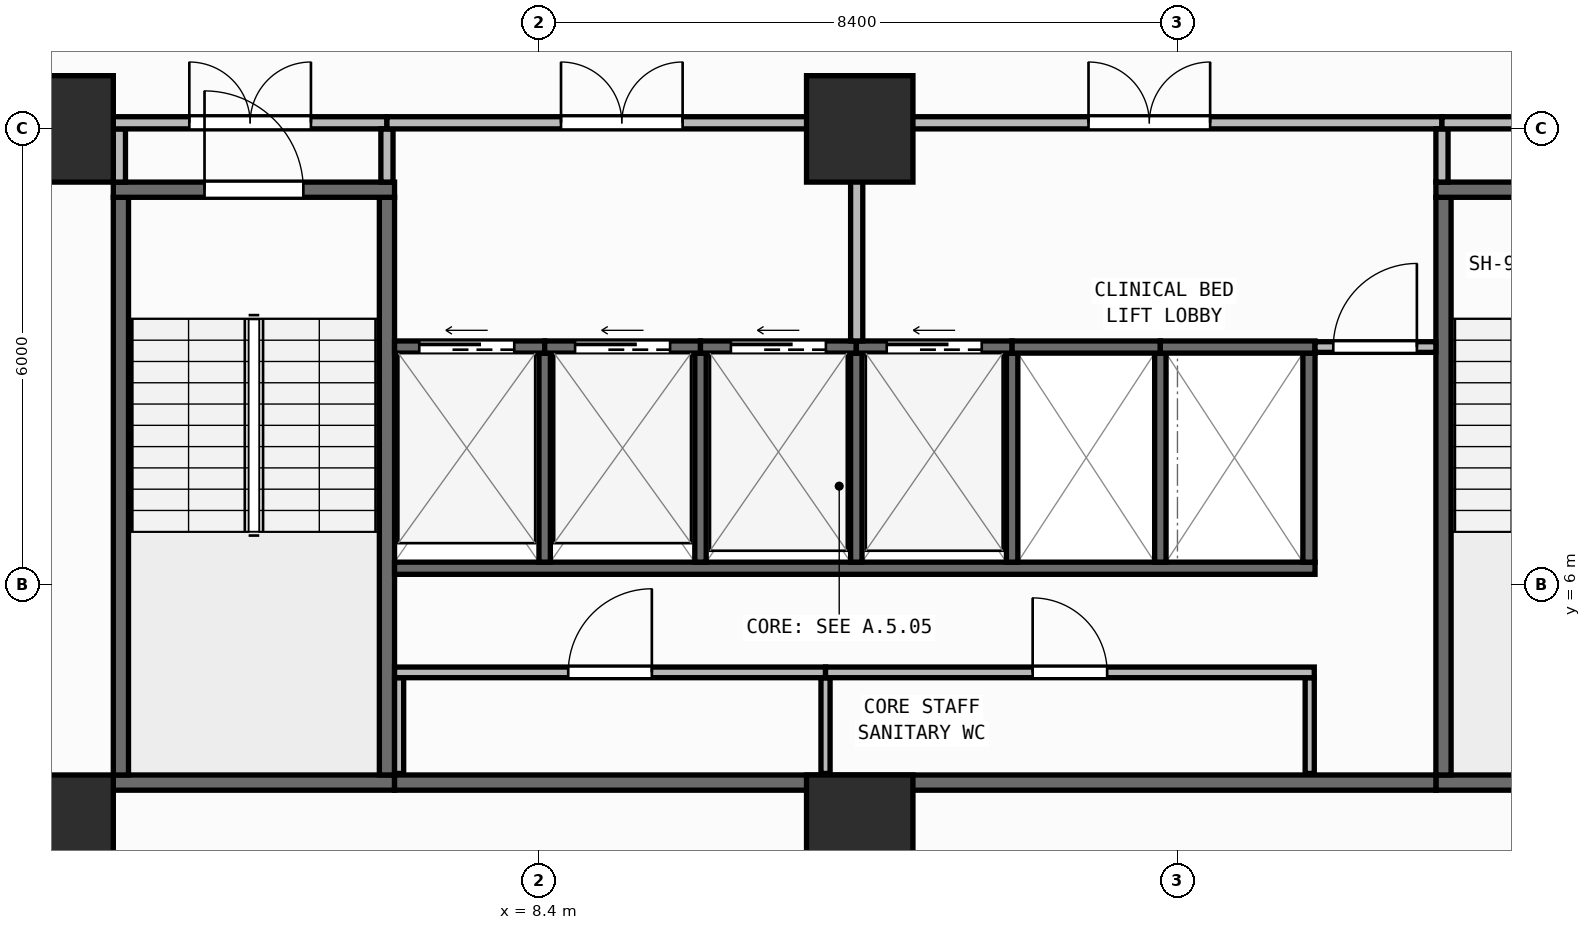
"""IFC4 building model, lengths in metres.
Left out: names, types, materials, properties, quantities, classifications, styles, units other than length and angle.
Written with IfcOpenShell. Run it as: python <this file> out.ifc"""

import sys

from ifc_helpers import new_model, si_unit, direction, frame, frame_2d, origin, origin_2d, place, context, subcontext, project, spatial, rectangle, extrude, element, fill, save


model = new_model("IFC4")
c1 = context("Model", 3, precision=1e-05, world=origin(), true_north=direction((0.0, 1.0)))
c2 = subcontext(c1, "Body", "Model", "MODEL_VIEW")
j1 = project(units=[si_unit("LENGTHUNIT", "METRE"), si_unit("PLANEANGLEUNIT", "RADIAN")], contexts=[c1])
p1 = place(None, origin())
s1 = spatial("IfcSite", under=j1, at=p1, CompositionType="ELEMENT")
p2 = place(p1, origin())
s2 = spatial("IfcBuilding", under=s1, at=p2, CompositionType="ELEMENT")
p3 = place(p2, frame((0.0, 0.0, 30.4)))
s3 = spatial("IfcBuildingStorey", under=s2, at=p3, CompositionType="ELEMENT", Elevation=30.4)
for number, where, z_axis, x_axis in (
    (1, (2.1, 2.8, 0.0), (0.0, 0.0, 1.0), (1.0, 0.0, 0.0)),
    (2, (12.62, 2.8, 0.0), (0.0, 0.0, 1.0), (1.0, 0.0, 0.0)),
    (3, (2.1, 12.0, 0.0), (0.0, 0.0, 1.0), (1.0, 0.0, 0.0)),
    (4, (12.62, 12.0, 0.0), (0.0, 0.0, 1.0), (1.0, 0.0, 0.0)),
):
    element("IfcColumn", number, at=place(p3, frame(where, z_axis=z_axis, x_axis=x_axis)), inside=s3, PredefinedType="COLUMN", context=c2, shape_type="SweptSolid", body=[
        extrude(rectangle(XDim=1.4, YDim=1.4, at=origin_2d()), origin(), (0.0, 0.0, 1.0), 3.95),
    ])
p4 = place(p3, frame((2.76, 0.174, 0.0), z_axis=(0.0, 0.0, 1.0), x_axis=(0.996571478456, 0.082736257641, 0.0)))
e5 = element("IfcWall", 5, at=p4, inside=s3, PredefinedType="STANDARD", context=c2, shape_type="SweptSolid", body=[
    extrude(rectangle(XDim=52.861, YDim=0.26, at=frame_2d((26.431, 0.0))), origin(), (0.0, 0.0, 1.0), 3.71),
])
p5 = place(p4, frame((25.231, 0.0, 0.9)))
e6 = element("IfcOpeningElement", 6, at=p5, cuts=e5, PredefinedType="OPENING", context=c2, shape_type="SweptSolid", body=[
    extrude(rectangle(XDim=2.4, YDim=1.65, at=frame_2d((1.2, 0.825))), frame((0.0, 0.14, 0.0), z_axis=(0.0, -1.0, 0.0), x_axis=(1.0, 0.0, 0.0)), (0.0, 0.0, 1.0), 0.28),
])
p6 = place(p3, frame((2.8, 3.4, 0.0), z_axis=(0.0, 0.0, 1.0), x_axis=(1.0, 0.0, 0.0)))
e7 = element("IfcWall", 7, at=p6, inside=s3, PredefinedType="SHEAR", context=c2, shape_type="SweptSolid", body=[
    extrude(rectangle(XDim=3.7, YDim=0.2, at=frame_2d((1.85, 0.0))), origin(), (0.0, 0.0, 1.0), 3.71),
])
for number, where, z_axis, x_axis in (
    (8, (2.9, 3.5, 0.0), (0.0, 0.0, 1.0), (0.0, 1.0, 0.0)),
    (9, (6.4, 3.5, 0.0), (0.0, 0.0, 1.0), (0.0, 1.0, 0.0)),
):
    element("IfcWall", number, at=place(p3, frame(where, z_axis=z_axis, x_axis=x_axis)), inside=s3, PredefinedType="SHEAR", context=c2, shape_type="SweptSolid", body=[
        extrude(rectangle(XDim=7.6, YDim=0.2, at=frame_2d((3.8, 0.0))), origin(), (0.0, 0.0, 1.0), 3.71),
    ])
p7 = place(p3, frame((2.8, 11.2, 0.0), z_axis=(0.0, 0.0, 1.0), x_axis=(1.0, 0.0, 0.0)))
e10 = element("IfcWall", 10, at=p7, inside=s3, PredefinedType="SHEAR", context=c2, shape_type="SweptSolid", body=[
    extrude(rectangle(XDim=3.7, YDim=0.2, at=frame_2d((1.85, 0.0))), origin(), (0.0, 0.0, 1.0), 3.71),
])
p8 = place(p7, frame((1.2, 0.0, 0.0)))
e11 = element("IfcOpeningElement", 11, at=p8, cuts=e10, PredefinedType="OPENING", context=c2, shape_type="SweptSolid", body=[
    extrude(rectangle(XDim=1.3, YDim=2.15, at=frame_2d((0.65, 1.075))), frame((0.0, 0.11, 0.0), z_axis=(0.0, -1.0, 0.0), x_axis=(1.0, 0.0, 0.0)), (0.0, 0.0, 1.0), 0.22),
])
p9 = place(p3, frame((20.2, 3.4, 0.0), z_axis=(0.0, 0.0, 1.0), x_axis=(1.0, 0.0, 0.0)))
e12 = element("IfcWall", 12, at=p9, inside=s3, PredefinedType="SHEAR", context=c2, shape_type="SweptSolid", body=[
    extrude(rectangle(XDim=3.7, YDim=0.2, at=frame_2d((1.85, 0.0))), origin(), (0.0, 0.0, 1.0), 3.71),
])
p10 = place(p3, frame((20.3, 3.5, 0.0), z_axis=(0.0, 0.0, 1.0), x_axis=(0.0, 1.0, 0.0)))
e13 = element("IfcWall", 13, at=p10, inside=s3, PredefinedType="SHEAR", context=c2, shape_type="SweptSolid", body=[
    extrude(rectangle(XDim=7.6, YDim=0.2, at=frame_2d((3.8, 0.0))), origin(), (0.0, 0.0, 1.0), 3.71),
])
p11 = place(p3, frame((20.2, 11.2, 0.0), z_axis=(0.0, 0.0, 1.0), x_axis=(1.0, 0.0, 0.0)))
e14 = element("IfcWall", 14, at=p11, inside=s3, PredefinedType="SHEAR", context=c2, shape_type="SweptSolid", body=[
    extrude(rectangle(XDim=3.7, YDim=0.2, at=frame_2d((1.85, 0.0))), origin(), (0.0, 0.0, 1.0), 3.71),
])
p12 = place(p11, frame((1.2, 0.0, 0.0)))
e15 = element("IfcOpeningElement", 15, at=p12, cuts=e14, PredefinedType="OPENING", context=c2, shape_type="SweptSolid", body=[
    extrude(rectangle(XDim=1.3, YDim=2.15, at=frame_2d((0.65, 1.075))), frame((0.0, 0.11, 0.0), z_axis=(0.0, -1.0, 0.0), x_axis=(1.0, 0.0, 0.0)), (0.0, 0.0, 1.0), 0.22),
])
p13 = place(p3, frame((6.5, 3.4, 0.0), z_axis=(0.0, 0.0, 1.0), x_axis=(1.0, 0.0, 0.0)))
e16 = element("IfcWall", 16, at=p13, inside=s3, PredefinedType="SHEAR", context=c2, shape_type="SweptSolid", body=[
    extrude(rectangle(XDim=13.7, YDim=0.2, at=frame_2d((6.85, 0.0))), origin(), (0.0, 0.0, 1.0), 3.71),
])
p14 = place(p3, frame((6.5, 6.22, 0.0), z_axis=(0.0, 0.0, 1.0), x_axis=(1.0, 0.0, 0.0)))
e17 = element("IfcWall", 17, at=p14, inside=s3, PredefinedType="SHEAR", context=c2, shape_type="SweptSolid", body=[
    extrude(rectangle(XDim=12.11, YDim=0.16, at=frame_2d((6.055, 0.0))), origin(), (0.0, 0.0, 1.0), 3.71),
])
p15 = place(p3, frame((18.53, 6.3, 0.0), z_axis=(0.0, 0.0, 1.0), x_axis=(0.0, 1.0, 0.0)))
e18 = element("IfcWall", 18, at=p15, inside=s3, PredefinedType="SHEAR", context=c2, shape_type="SweptSolid", body=[
    extrude(rectangle(XDim=2.75, YDim=0.16, at=frame_2d((1.375, 0.0))), origin(), (0.0, 0.0, 1.0), 3.71),
])
for number, where, z_axis, x_axis in (
    (19, (8.475, 6.3, 0.0), (0.0, 0.0, 1.0), (0.0, 1.0, 0.0)),
    (20, (10.525, 6.3, 0.0), (0.0, 0.0, 1.0), (0.0, 1.0, 0.0)),
    (21, (12.575, 6.3, 0.0), (0.0, 0.0, 1.0), (0.0, 1.0, 0.0)),
    (22, (14.625, 6.3, 0.0), (0.0, 0.0, 1.0), (0.0, 1.0, 0.0)),
    (23, (16.575, 6.3, 0.0), (0.0, 0.0, 1.0), (0.0, 1.0, 0.0)),
):
    element("IfcWall", number, at=place(p3, frame(where, z_axis=z_axis, x_axis=x_axis)), inside=s3, PredefinedType="SHEAR", context=c2, shape_type="SweptSolid", body=[
        extrude(rectangle(XDim=2.75, YDim=0.15, at=frame_2d((1.375, 0.0))), origin(), (0.0, 0.0, 1.0), 3.71),
    ])
p16 = place(p3, frame((6.5, 9.13, 0.0), z_axis=(0.0, 0.0, 1.0), x_axis=(1.0, 0.0, 0.0)))
e24 = element("IfcWall", 24, at=p16, inside=s3, PredefinedType="SHEAR", context=c2, shape_type="SweptSolid", body=[
    extrude(rectangle(XDim=1.975, YDim=0.16, at=frame_2d((0.988, 0.0))), origin(), (0.0, 0.0, 1.0), 3.71),
])
p17 = place(p16, frame((0.325, 0.0, 0.0)))
e25 = element("IfcOpeningElement", 25, at=p17, cuts=e24, PredefinedType="OPENING", context=c2, shape_type="SweptSolid", body=[
    extrude(rectangle(XDim=1.25, YDim=2.15, at=frame_2d((0.625, 1.075))), frame((0.0, 0.09, 0.0), z_axis=(0.0, -1.0, 0.0), x_axis=(1.0, 0.0, 0.0)), (0.0, 0.0, 1.0), 0.18),
])
p18 = place(p3, frame((8.475, 9.13, 0.0), z_axis=(0.0, 0.0, 1.0), x_axis=(1.0, 0.0, 0.0)))
e26 = element("IfcWall", 26, at=p18, inside=s3, PredefinedType="SHEAR", context=c2, shape_type="SweptSolid", body=[
    extrude(rectangle(XDim=2.05, YDim=0.16, at=frame_2d((1.025, 0.0))), origin(), (0.0, 0.0, 1.0), 3.71),
])
p19 = place(p18, frame((0.4, 0.0, 0.0)))
e27 = element("IfcOpeningElement", 27, at=p19, cuts=e26, PredefinedType="OPENING", context=c2, shape_type="SweptSolid", body=[
    extrude(rectangle(XDim=1.25, YDim=2.15, at=frame_2d((0.625, 1.075))), frame((0.0, 0.09, 0.0), z_axis=(0.0, -1.0, 0.0), x_axis=(1.0, 0.0, 0.0)), (0.0, 0.0, 1.0), 0.18),
])
p20 = place(p3, frame((10.525, 9.13, 0.0), z_axis=(0.0, 0.0, 1.0), x_axis=(1.0, 0.0, 0.0)))
e28 = element("IfcWall", 28, at=p20, inside=s3, PredefinedType="SHEAR", context=c2, shape_type="SweptSolid", body=[
    extrude(rectangle(XDim=2.05, YDim=0.16, at=frame_2d((1.025, 0.0))), origin(), (0.0, 0.0, 1.0), 3.71),
])
p21 = place(p20, frame((0.4, 0.0, 0.0)))
e29 = element("IfcOpeningElement", 29, at=p21, cuts=e28, PredefinedType="OPENING", context=c2, shape_type="SweptSolid", body=[
    extrude(rectangle(XDim=1.25, YDim=2.15, at=frame_2d((0.625, 1.075))), frame((0.0, 0.09, 0.0), z_axis=(0.0, -1.0, 0.0), x_axis=(1.0, 0.0, 0.0)), (0.0, 0.0, 1.0), 0.18),
])
p22 = place(p3, frame((12.575, 9.13, 0.0), z_axis=(0.0, 0.0, 1.0), x_axis=(1.0, 0.0, 0.0)))
e30 = element("IfcWall", 30, at=p22, inside=s3, PredefinedType="SHEAR", context=c2, shape_type="SweptSolid", body=[
    extrude(rectangle(XDim=2.05, YDim=0.16, at=frame_2d((1.025, 0.0))), origin(), (0.0, 0.0, 1.0), 3.71),
])
p23 = place(p22, frame((0.4, 0.0, 0.0)))
e31 = element("IfcOpeningElement", 31, at=p23, cuts=e30, PredefinedType="OPENING", context=c2, shape_type="SweptSolid", body=[
    extrude(rectangle(XDim=1.25, YDim=2.15, at=frame_2d((0.625, 1.075))), frame((0.0, 0.09, 0.0), z_axis=(0.0, -1.0, 0.0), x_axis=(1.0, 0.0, 0.0)), (0.0, 0.0, 1.0), 0.18),
])
p24 = place(p3, frame((14.625, 9.13, 0.0), z_axis=(0.0, 0.0, 1.0), x_axis=(1.0, 0.0, 0.0)))
e32 = element("IfcWall", 32, at=p24, inside=s3, PredefinedType="SHEAR", context=c2, shape_type="SweptSolid", body=[
    extrude(rectangle(XDim=1.95, YDim=0.16, at=frame_2d((0.975, 0.0))), origin(), (0.0, 0.0, 1.0), 3.71),
])
p25 = place(p3, frame((16.575, 9.13, 0.0), z_axis=(0.0, 0.0, 1.0), x_axis=(1.0, 0.0, 0.0)))
e33 = element("IfcWall", 33, at=p25, inside=s3, PredefinedType="SHEAR", context=c2, shape_type="SweptSolid", body=[
    extrude(rectangle(XDim=2.035, YDim=0.16, at=frame_2d((1.018, 0.0))), origin(), (0.0, 0.0, 1.0), 3.71),
])
for number, where, z_axis, x_axis in (
    (34, (6.56, 3.52, 0.0), (0.0, 0.0, 1.0), (0.0, 1.0, 0.0)),
    (35, (12.17, 3.52, 0.0), (0.0, 0.0, 1.0), (0.0, 1.0, 0.0)),
    (36, (18.54, 3.52, 0.0), (0.0, 0.0, 1.0), (0.0, 1.0, 0.0)),
):
    element("IfcWall", number, at=place(p3, frame(where, z_axis=z_axis, x_axis=x_axis)), inside=s3, PredefinedType="PARTITIONING", context=c2, shape_type="SweptSolid", body=[
        extrude(rectangle(XDim=1.26, YDim=0.12, at=frame_2d((0.63, 0.0))), origin(), (0.0, 0.0, 1.0), 3.71),
    ])
p26 = place(p3, frame((6.5, 4.85, 0.0), z_axis=(0.0, 0.0, 1.0), x_axis=(1.0, 0.0, 0.0)))
e37 = element("IfcWall", 37, at=p26, inside=s3, PredefinedType="PARTITIONING", context=c2, shape_type="SweptSolid", body=[
    extrude(rectangle(XDim=5.67, YDim=0.14, at=frame_2d((2.835, 0.0))), origin(), (0.0, 0.0, 1.0), 3.71),
])
p27 = place(p26, frame((2.285, 0.0, 0.0)))
e38 = element("IfcOpeningElement", 38, at=p27, cuts=e37, PredefinedType="OPENING", context=c2, shape_type="SweptSolid", body=[
    extrude(rectangle(XDim=1.1, YDim=2.1, at=frame_2d((0.55, 1.05))), frame((0.0, 0.08, 0.0), z_axis=(0.0, -1.0, 0.0), x_axis=(1.0, 0.0, 0.0)), (0.0, 0.0, 1.0), 0.16),
])
p28 = place(p3, frame((12.17, 4.85, 0.0), z_axis=(0.0, 0.0, 1.0), x_axis=(1.0, 0.0, 0.0)))
e39 = element("IfcWall", 39, at=p28, inside=s3, PredefinedType="PARTITIONING", context=c2, shape_type="SweptSolid", body=[
    extrude(rectangle(XDim=6.43, YDim=0.14, at=frame_2d((3.215, 0.0))), origin(), (0.0, 0.0, 1.0), 3.71),
])
p29 = place(p28, frame((2.725, 0.0, 0.0)))
e40 = element("IfcOpeningElement", 40, at=p29, cuts=e39, PredefinedType="OPENING", context=c2, shape_type="SweptSolid", body=[
    extrude(rectangle(XDim=0.98, YDim=2.1, at=frame_2d((0.49, 1.05))), frame((0.0, 0.08, 0.0), z_axis=(0.0, -1.0, 0.0), x_axis=(1.0, 0.0, 0.0)), (0.0, 0.0, 1.0), 0.16),
])
p30 = place(p3, frame((18.61, 9.13, 0.0), z_axis=(0.0, 0.0, 1.0), x_axis=(1.0, 0.0, 0.0)))
e41 = element("IfcWall", 41, at=p30, inside=s3, PredefinedType="PARTITIONING", context=c2, shape_type="SweptSolid", body=[
    extrude(rectangle(XDim=1.59, YDim=0.14, at=frame_2d((0.795, 0.0))), origin(), (0.0, 0.0, 1.0), 3.71),
])
p31 = place(p30, frame((0.24, 0.0, 0.0)))
e42 = element("IfcOpeningElement", 42, at=p31, cuts=e41, PredefinedType="OPENING", context=c2, shape_type="SweptSolid", body=[
    extrude(rectangle(XDim=1.1, YDim=2.1, at=frame_2d((0.55, 1.05))), frame((0.0, 0.08, 0.0), z_axis=(0.0, -1.0, 0.0), x_axis=(1.0, 0.0, 0.0)), (0.0, 0.0, 1.0), 0.16),
])
p32 = place(p3, frame((2.88, 11.3, 0.0), z_axis=(0.0, 0.0, 1.0), x_axis=(0.0, 1.0, 0.0)))
e43 = element("IfcWall", 43, at=p32, inside=s3, PredefinedType="PARTITIONING", context=c2, shape_type="SweptSolid", body=[
    extrude(rectangle(XDim=0.7, YDim=0.16, at=frame_2d((0.35, 0.0))), origin(), (0.0, 0.0, 1.0), 3.71),
])
p33 = place(p3, frame((2.8, 12.08, 0.0), z_axis=(0.0, 0.0, 1.0), x_axis=(1.0, 0.0, 0.0)))
e44 = element("IfcWall", 44, at=p33, inside=s3, PredefinedType="PARTITIONING", context=c2, shape_type="SweptSolid", body=[
    extrude(rectangle(XDim=3.6, YDim=0.16, at=frame_2d((1.8, 0.0))), origin(), (0.0, 0.0, 1.0), 3.073),
])
p34 = place(p33, frame((1.0, 0.0, 0.0)))
e45 = element("IfcOpeningElement", 45, at=p34, cuts=e44, PredefinedType="OPENING", context=c2, shape_type="SweptSolid", body=[
    extrude(rectangle(XDim=1.6, YDim=2.05, at=frame_2d((0.8, 1.025))), frame((0.0, 0.09, 0.0), z_axis=(0.0, -1.0, 0.0), x_axis=(1.0, 0.0, 0.0)), (0.0, 0.0, 1.0), 0.18),
])
p35 = place(p3, frame((6.4, 11.3, 0.0), z_axis=(0.0, 0.0, 1.0), x_axis=(0.0, 1.0, 0.0)))
e46 = element("IfcWall", 46, at=p35, inside=s3, PredefinedType="PARTITIONING", context=c2, shape_type="SweptSolid", body=[
    extrude(rectangle(XDim=0.7, YDim=0.16, at=frame_2d((0.35, 0.0))), origin(), (0.0, 0.0, 1.0), 3.71),
])
p36 = place(p3, frame((6.4, 12.08, 0.0), z_axis=(0.0, 0.0, 1.0), x_axis=(1.0, 0.0, 0.0)))
e47 = element("IfcWall", 47, at=p36, inside=s3, PredefinedType="PARTITIONING", context=c2, shape_type="SweptSolid", body=[
    extrude(rectangle(XDim=6.18, YDim=0.16, at=frame_2d((3.09, 0.0))), origin(), (0.0, 0.0, 1.0), 3.073),
])
p37 = place(p36, frame((2.29, 0.0, 0.0)))
e48 = element("IfcOpeningElement", 48, at=p37, cuts=e47, PredefinedType="OPENING", context=c2, shape_type="SweptSolid", body=[
    extrude(rectangle(XDim=1.6, YDim=2.05, at=frame_2d((0.8, 1.025))), frame((0.0, 0.09, 0.0), z_axis=(0.0, -1.0, 0.0), x_axis=(1.0, 0.0, 0.0)), (0.0, 0.0, 1.0), 0.18),
])
p38 = place(p3, frame((12.58, 9.21, 0.0), z_axis=(0.0, 0.0, 1.0), x_axis=(0.0, 1.0, 0.0)))
e49 = element("IfcWall", 49, at=p38, inside=s3, PredefinedType="PARTITIONING", context=c2, shape_type="SweptSolid", body=[
    extrude(rectangle(XDim=2.79, YDim=0.16, at=frame_2d((1.395, 0.0))), origin(), (0.0, 0.0, 1.0), 3.71),
])
p39 = place(p3, frame((12.58, 12.08, 0.0), z_axis=(0.0, 0.0, 1.0), x_axis=(1.0, 0.0, 0.0)))
e50 = element("IfcWall", 50, at=p39, inside=s3, PredefinedType="PARTITIONING", context=c2, shape_type="SweptSolid", body=[
    extrude(rectangle(XDim=7.7, YDim=0.16, at=frame_2d((3.85, 0.0))), origin(), (0.0, 0.0, 1.0), 3.073),
])
p40 = place(p39, frame((3.05, 0.0, 0.0)))
e51 = element("IfcOpeningElement", 51, at=p40, cuts=e50, PredefinedType="OPENING", context=c2, shape_type="SweptSolid", body=[
    extrude(rectangle(XDim=1.6, YDim=2.05, at=frame_2d((0.8, 1.025))), frame((0.0, 0.09, 0.0), z_axis=(0.0, -1.0, 0.0), x_axis=(1.0, 0.0, 0.0)), (0.0, 0.0, 1.0), 0.18),
])
p41 = place(p3, frame((20.28, 11.3, 0.0), z_axis=(0.0, 0.0, 1.0), x_axis=(0.0, 1.0, 0.0)))
e52 = element("IfcWall", 52, at=p41, inside=s3, PredefinedType="PARTITIONING", context=c2, shape_type="SweptSolid", body=[
    extrude(rectangle(XDim=0.7, YDim=0.16, at=frame_2d((0.35, 0.0))), origin(), (0.0, 0.0, 1.0), 3.71),
])
p42 = place(p3, frame((20.28, 12.08, 0.0), z_axis=(0.0, 0.0, 1.0), x_axis=(1.0, 0.0, 0.0)))
e53 = element("IfcWall", 53, at=p42, inside=s3, PredefinedType="PARTITIONING", context=c2, shape_type="SweptSolid", body=[
    extrude(rectangle(XDim=3.62, YDim=0.16, at=frame_2d((1.81, 0.0))), origin(), (0.0, 0.0, 1.0), 3.073),
])
p43 = place(p42, frame((1.01, 0.0, 0.0)))
e54 = element("IfcOpeningElement", 54, at=p43, cuts=e53, PredefinedType="OPENING", context=c2, shape_type="SweptSolid", body=[
    extrude(rectangle(XDim=1.6, YDim=2.05, at=frame_2d((0.8, 1.025))), frame((0.0, 0.09, 0.0), z_axis=(0.0, -1.0, 0.0), x_axis=(1.0, 0.0, 0.0)), (0.0, 0.0, 1.0), 0.18),
])
p44 = place(p8, origin())
e55 = element("IfcDoor", 55, at=p44, inside=s3, OperationType="SINGLE_SWING_LEFT", PredefinedType="DOOR", context=c2, shape_type="SweptSolid", body=[
    extrude(rectangle(XDim=1.3, YDim=2.15, at=frame_2d((0.65, 1.075))), frame((0.0, 0.025, 0.0), z_axis=(0.0, -1.0, 0.0), x_axis=(1.0, 0.0, 0.0)), (0.0, 0.0, 1.0), 0.05),
])
fill(e11, e55)
p45 = place(p17, origin())
e56 = element("IfcDoor", 56, at=p45, inside=s3, OperationType="SLIDING_TO_LEFT", PredefinedType="DOOR", context=c2, shape_type="SweptSolid", body=[
    extrude(rectangle(XDim=1.25, YDim=2.15, at=frame_2d((0.625, 1.075))), frame((0.0, 0.025, 0.0), z_axis=(0.0, -1.0, 0.0), x_axis=(1.0, 0.0, 0.0)), (0.0, 0.0, 1.0), 0.05),
])
fill(e25, e56)
p46 = place(p19, origin())
e57 = element("IfcDoor", 57, at=p46, inside=s3, OperationType="SLIDING_TO_LEFT", PredefinedType="DOOR", context=c2, shape_type="SweptSolid", body=[
    extrude(rectangle(XDim=1.25, YDim=2.15, at=frame_2d((0.625, 1.075))), frame((0.0, 0.025, 0.0), z_axis=(0.0, -1.0, 0.0), x_axis=(1.0, 0.0, 0.0)), (0.0, 0.0, 1.0), 0.05),
])
fill(e27, e57)
p47 = place(p21, origin())
e58 = element("IfcDoor", 58, at=p47, inside=s3, OperationType="SLIDING_TO_LEFT", PredefinedType="DOOR", context=c2, shape_type="SweptSolid", body=[
    extrude(rectangle(XDim=1.25, YDim=2.15, at=frame_2d((0.625, 1.075))), frame((0.0, 0.025, 0.0), z_axis=(0.0, -1.0, 0.0), x_axis=(1.0, 0.0, 0.0)), (0.0, 0.0, 1.0), 0.05),
])
fill(e29, e58)
p48 = place(p23, origin())
e59 = element("IfcDoor", 59, at=p48, inside=s3, OperationType="SLIDING_TO_LEFT", PredefinedType="DOOR", context=c2, shape_type="SweptSolid", body=[
    extrude(rectangle(XDim=1.25, YDim=2.15, at=frame_2d((0.625, 1.075))), frame((0.0, 0.025, 0.0), z_axis=(0.0, -1.0, 0.0), x_axis=(1.0, 0.0, 0.0)), (0.0, 0.0, 1.0), 0.05),
])
fill(e31, e59)
p49 = place(p27, origin())
e60 = element("IfcDoor", 60, at=p49, inside=s3, OperationType="SINGLE_SWING_RIGHT", PredefinedType="DOOR", context=c2, shape_type="SweptSolid", body=[
    extrude(rectangle(XDim=1.1, YDim=2.1, at=frame_2d((0.55, 1.05))), frame((0.0, 0.025, 0.0), z_axis=(0.0, -1.0, 0.0), x_axis=(1.0, 0.0, 0.0)), (0.0, 0.0, 1.0), 0.05),
])
fill(e38, e60)
p50 = place(p29, origin())
e61 = element("IfcDoor", 61, at=p50, inside=s3, OperationType="SINGLE_SWING_LEFT", PredefinedType="DOOR", context=c2, shape_type="SweptSolid", body=[
    extrude(rectangle(XDim=0.98, YDim=2.1, at=frame_2d((0.49, 1.05))), frame((0.0, 0.025, 0.0), z_axis=(0.0, -1.0, 0.0), x_axis=(1.0, 0.0, 0.0)), (0.0, 0.0, 1.0), 0.05),
])
fill(e40, e61)
p51 = place(p31, origin())
e62 = element("IfcDoor", 62, at=p51, inside=s3, OperationType="SINGLE_SWING_RIGHT", PredefinedType="DOOR", context=c2, shape_type="SweptSolid", body=[
    extrude(rectangle(XDim=1.1, YDim=2.1, at=frame_2d((0.55, 1.05))), frame((0.0, 0.025, 0.0), z_axis=(0.0, -1.0, 0.0), x_axis=(1.0, 0.0, 0.0)), (0.0, 0.0, 1.0), 0.05),
])
fill(e42, e62)
p52 = place(p34, origin())
e63 = element("IfcDoor", 63, at=p52, inside=s3, OperationType="DOUBLE_DOOR_SINGLE_SWING", PredefinedType="DOOR", context=c2, shape_type="SweptSolid", body=[
    extrude(rectangle(XDim=1.6, YDim=2.05, at=frame_2d((0.8, 1.025))), frame((0.0, 0.025, 0.0), z_axis=(0.0, -1.0, 0.0), x_axis=(1.0, 0.0, 0.0)), (0.0, 0.0, 1.0), 0.05),
])
fill(e45, e63)
p53 = place(p37, origin())
e64 = element("IfcDoor", 64, at=p53, inside=s3, OperationType="DOUBLE_DOOR_SINGLE_SWING", PredefinedType="DOOR", context=c2, shape_type="SweptSolid", body=[
    extrude(rectangle(XDim=1.6, YDim=2.05, at=frame_2d((0.8, 1.025))), frame((0.0, 0.025, 0.0), z_axis=(0.0, -1.0, 0.0), x_axis=(1.0, 0.0, 0.0)), (0.0, 0.0, 1.0), 0.05),
])
fill(e48, e64)
p54 = place(p40, origin())
e65 = element("IfcDoor", 65, at=p54, inside=s3, OperationType="DOUBLE_DOOR_SINGLE_SWING", PredefinedType="DOOR", context=c2, shape_type="SweptSolid", body=[
    extrude(rectangle(XDim=1.6, YDim=2.05, at=frame_2d((0.8, 1.025))), frame((0.0, 0.025, 0.0), z_axis=(0.0, -1.0, 0.0), x_axis=(1.0, 0.0, 0.0)), (0.0, 0.0, 1.0), 0.05),
])
fill(e51, e65)
save(model, sys.argv[1])
